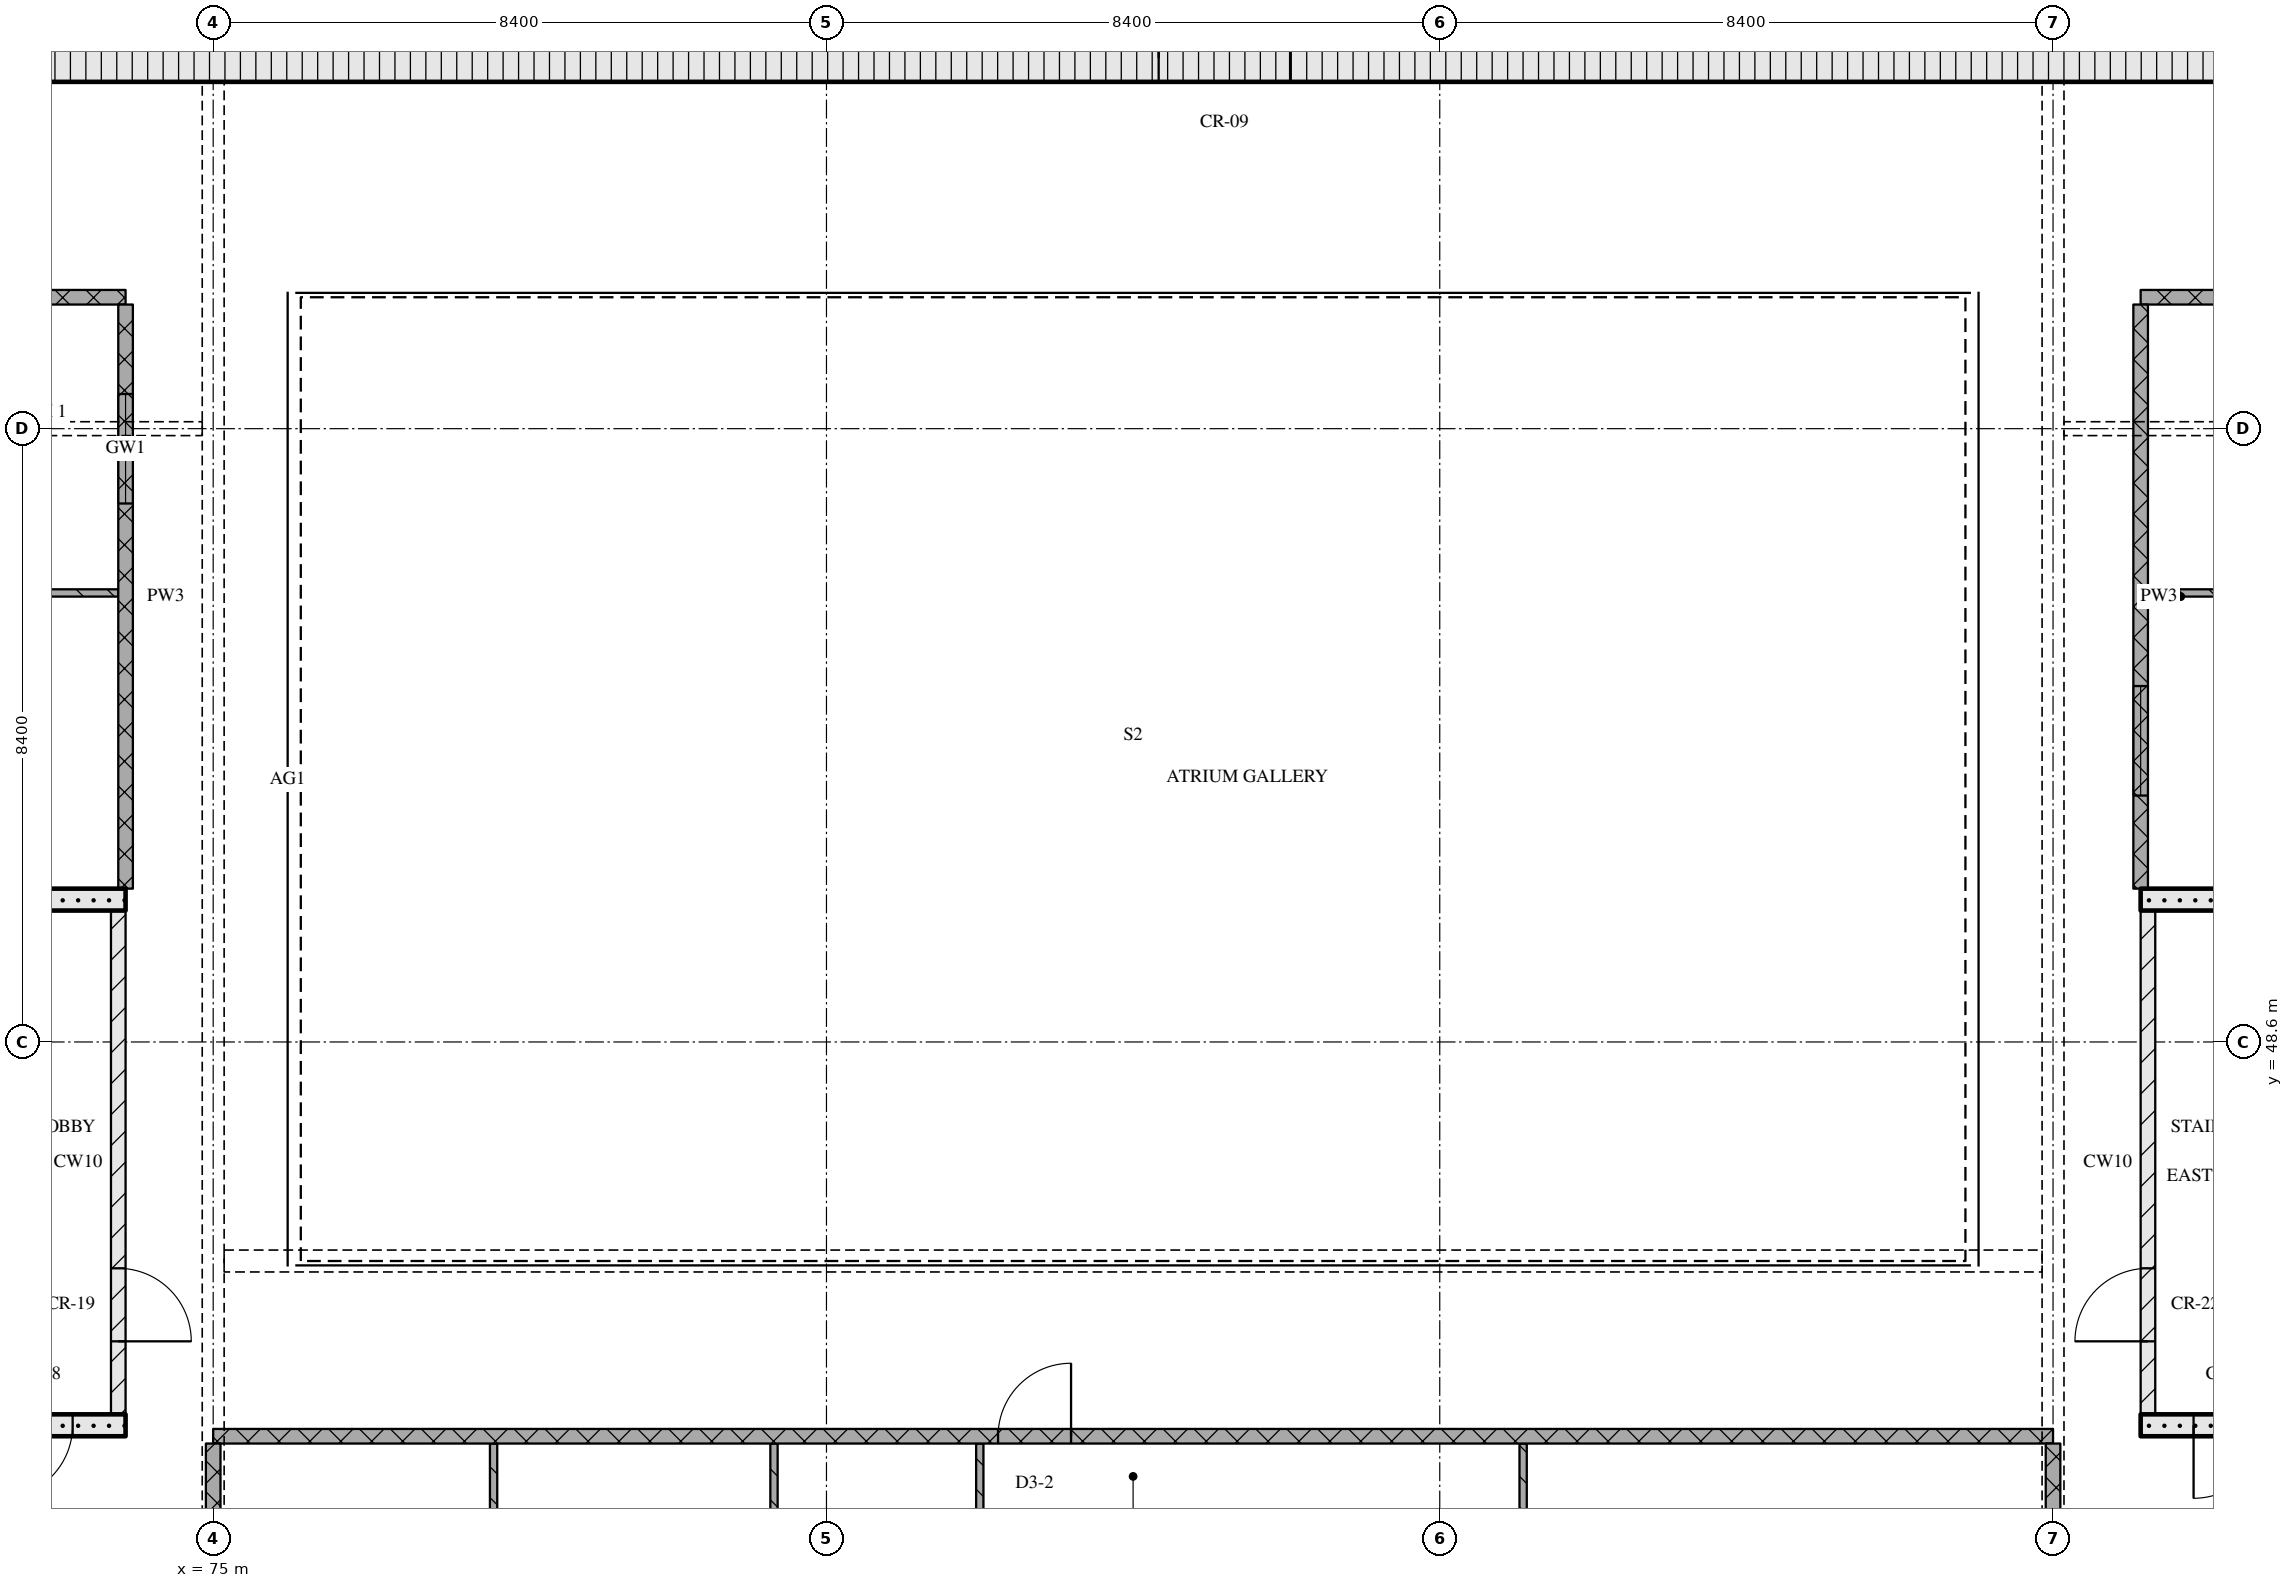
"""IFC4 building model, lengths in metres.
Left out: names, types, materials, properties, quantities, classifications, styles, units other than length and angle.
Written with IfcOpenShell. Run it as: python <this file> out.ifc"""

import sys

from ifc_helpers import new_model, si_unit, direction, frame, frame_2d, origin, place, context, subcontext, project, spatial, rectangle, extrude, element, fill, save


model = new_model("IFC4")
c1 = context("Model", 3, precision=1e-05, world=origin(), true_north=direction((0.0, 1.0)))
c2 = subcontext(c1, "Body", "Model", "MODEL_VIEW")
j1 = project(units=[si_unit("LENGTHUNIT", "METRE"), si_unit("PLANEANGLEUNIT", "RADIAN")], contexts=[c1])
p1 = place(None, origin())
s1 = spatial("IfcSite", under=j1, at=p1, CompositionType="ELEMENT")
p2 = place(p1, origin())
s2 = spatial("IfcBuilding", under=s1, at=p2, CompositionType="ELEMENT")
p3 = place(p2, frame((0.0, 0.0, 230.7)))
s3 = spatial("IfcBuildingStorey", under=s2, at=p3, CompositionType="ELEMENT", Elevation=230.7)
p4 = place(p3, frame((67.15, 62.075, 0.0), z_axis=(0.0, 0.0, 1.0), x_axis=(1.0, 0.0, 0.0)))
e1 = element("IfcWall", 1, at=p4, inside=s3, PredefinedType="SOLIDWALL", context=c2, shape_type="SweptSolid", body=[
    extrude(rectangle(XDim=40.9, YDim=0.65, at=frame_2d((20.45, 0.0))), origin(), (0.0, 0.0, 1.0), 3.32),
])
p5 = place(p4, frame((20.8, 0.0, 0.0)))
e2 = element("IfcOpeningElement", 2, at=p5, cuts=e1, PredefinedType="OPENING", context=c2, shape_type="SweptSolid", body=[
    extrude(rectangle(XDim=1.8, YDim=2.1, at=frame_2d((0.9, 1.05))), frame((0.0, 0.335, 0.0), z_axis=(0.0, -1.0, 0.0), x_axis=(1.0, 0.0, 0.0)), (0.0, 0.0, 1.0), 0.67),
])
p6 = place(p3, frame((68.2, 43.35, 0.0), z_axis=(0.0, 0.0, 1.0), x_axis=(1.0, 0.0, 0.0)))
e3 = element("IfcWall", 3, at=p6, inside=s3, PredefinedType="SOLIDWALL", context=c2, shape_type="SweptSolid", body=[
    extrude(rectangle(XDim=5.6, YDim=0.3, at=frame_2d((2.8, 0.0))), origin(), (0.0, 0.0, 1.0), 3.32),
])
p7 = place(p6, frame((3.875, 0.0, 0.0)))
e4 = element("IfcOpeningElement", 4, at=p7, cuts=e3, PredefinedType="OPENING", context=c2, shape_type="SweptSolid", body=[
    extrude(rectangle(XDim=1.0, YDim=2.1, at=frame_2d((0.5, 1.05))), frame((0.0, 0.16, 0.0), z_axis=(0.0, -1.0, 0.0), x_axis=(1.0, 0.0, 0.0)), (0.0, 0.0, 1.0), 0.32),
])
p8 = place(p3, frame((73.7, 43.5, 0.0), z_axis=(0.0, 0.0, 1.0), x_axis=(0.0, 1.0, 0.0)))
e5 = element("IfcWall", 5, at=p8, inside=s3, PredefinedType="PARTITIONING", context=c2, shape_type="SweptSolid", body=[
    extrude(rectangle(XDim=6.9, YDim=0.2, at=frame_2d((3.45, 0.0))), origin(), (0.0, 0.0, 1.0), 3.32),
])
p9 = place(p8, frame((1.0, 0.0, 0.0)))
e6 = element("IfcOpeningElement", 6, at=p9, cuts=e5, PredefinedType="OPENING", context=c2, shape_type="SweptSolid", body=[
    extrude(rectangle(XDim=1.0, YDim=2.1, at=frame_2d((0.5, 1.05))), frame((0.0, 0.11, 0.0), z_axis=(0.0, -1.0, 0.0), x_axis=(1.0, 0.0, 0.0)), (0.0, 0.0, 1.0), 0.22),
])
p10 = place(p3, frame((68.2, 50.55, 0.0), z_axis=(0.0, 0.0, 1.0), x_axis=(1.0, 0.0, 0.0)))
e7 = element("IfcWall", 7, at=p10, inside=s3, PredefinedType="SOLIDWALL", context=c2, shape_type="SweptSolid", body=[
    extrude(rectangle(XDim=5.6, YDim=0.3, at=frame_2d((2.8, 0.0))), origin(), (0.0, 0.0, 1.0), 3.32),
])
p11 = place(p3, frame((101.4, 43.35, 0.0), z_axis=(0.0, 0.0, 1.0), x_axis=(1.0, 0.0, 0.0)))
e8 = element("IfcWall", 8, at=p11, inside=s3, PredefinedType="SOLIDWALL", context=c2, shape_type="SweptSolid", body=[
    extrude(rectangle(XDim=5.6, YDim=0.3, at=frame_2d((2.8, 0.0))), origin(), (0.0, 0.0, 1.0), 3.32),
])
p12 = place(p11, frame((0.725, 0.0, 0.0)))
e9 = element("IfcOpeningElement", 9, at=p12, cuts=e8, PredefinedType="OPENING", context=c2, shape_type="SweptSolid", body=[
    extrude(rectangle(XDim=1.0, YDim=2.1, at=frame_2d((0.5, 1.05))), frame((0.0, 0.16, 0.0), z_axis=(0.0, -1.0, 0.0), x_axis=(1.0, 0.0, 0.0)), (0.0, 0.0, 1.0), 0.32),
])
p13 = place(p3, frame((101.5, 43.5, 0.0), z_axis=(0.0, 0.0, 1.0), x_axis=(0.0, 1.0, 0.0)))
e10 = element("IfcWall", 10, at=p13, inside=s3, PredefinedType="PARTITIONING", context=c2, shape_type="SweptSolid", body=[
    extrude(rectangle(XDim=6.9, YDim=0.2, at=frame_2d((3.45, 0.0))), origin(), (0.0, 0.0, 1.0), 3.32),
])
p14 = place(p13, frame((1.0, 0.0, 0.0)))
e11 = element("IfcOpeningElement", 11, at=p14, cuts=e10, PredefinedType="OPENING", context=c2, shape_type="SweptSolid", body=[
    extrude(rectangle(XDim=1.0, YDim=2.1, at=frame_2d((0.5, 1.05))), frame((0.0, 0.11, 0.0), z_axis=(0.0, -1.0, 0.0), x_axis=(1.0, 0.0, 0.0)), (0.0, 0.0, 1.0), 0.22),
])
p15 = place(p3, frame((101.4, 50.55, 0.0), z_axis=(0.0, 0.0, 1.0), x_axis=(1.0, 0.0, 0.0)))
e12 = element("IfcWall", 12, at=p15, inside=s3, PredefinedType="SOLIDWALL", context=c2, shape_type="SweptSolid", body=[
    extrude(rectangle(XDim=5.6, YDim=0.3, at=frame_2d((2.8, 0.0))), origin(), (0.0, 0.0, 1.0), 3.32),
])
p16 = place(p3, frame((100.2, 43.2, 0.0), z_axis=(0.0, 0.0, 1.0), x_axis=(-1.0, 0.0, 0.0)))
e13 = element("IfcWall", 13, at=p16, inside=s3, PredefinedType="PARTITIONING", context=c2, shape_type="SweptSolid", body=[
    extrude(rectangle(XDim=25.2, YDim=0.2, at=frame_2d((12.6, 0.0))), origin(), (0.0, 0.0, 1.0), 3.32),
])
p17 = place(p16, frame((13.45, 0.0, 0.0)))
e14 = element("IfcOpeningElement", 14, at=p17, cuts=e13, PredefinedType="OPENING", context=c2, shape_type="SweptSolid", body=[
    extrude(rectangle(XDim=1.0, YDim=2.1, at=frame_2d((0.5, 1.05))), frame((0.0, 0.11, 0.0), z_axis=(0.0, -1.0, 0.0), x_axis=(1.0, 0.0, 0.0)), (0.0, 0.0, 1.0), 0.22),
])
p18 = place(p3, frame((69.3, 54.75, 0.0), z_axis=(0.0, 0.0, 1.0), x_axis=(1.0, 0.0, 0.0)))
e15 = element("IfcWall", 15, at=p18, inside=s3, PredefinedType="PARTITIONING", context=c2, shape_type="SweptSolid", body=[
    extrude(rectangle(XDim=4.4, YDim=0.1, at=frame_2d((2.2, 0.0))), origin(), (0.0, 0.0, 1.0), 3.32),
])
p19 = place(p3, frame((105.9, 54.75, 0.0), z_axis=(0.0, 0.0, 1.0), x_axis=(-1.0, 0.0, 0.0)))
e16 = element("IfcWall", 16, at=p19, inside=s3, PredefinedType="PARTITIONING", context=c2, shape_type="SweptSolid", body=[
    extrude(rectangle(XDim=4.4, YDim=0.1, at=frame_2d((2.2, 0.0))), origin(), (0.0, 0.0, 1.0), 3.32),
])
p20 = place(p19, frame((1.8, 0.0, 0.0)))
e17 = element("IfcOpeningElement", 17, at=p20, cuts=e16, PredefinedType="OPENING", context=c2, shape_type="SweptSolid", body=[
    extrude(rectangle(XDim=0.9, YDim=2.1, at=frame_2d((0.45, 1.05))), frame((0.0, 0.06, 0.0), z_axis=(0.0, -1.0, 0.0), x_axis=(1.0, 0.0, 0.0)), (0.0, 0.0, 1.0), 0.12),
])
p21 = place(p3, frame((63.0, 58.8, 0.0), z_axis=(0.0, 0.0, 1.0), x_axis=(1.0, 0.0, 0.0)))
e18 = element("IfcWall", 18, at=p21, inside=s3, PredefinedType="PARTITIONING", context=c2, shape_type="SweptSolid", body=[
    extrude(rectangle(XDim=10.8, YDim=0.2, at=frame_2d((5.4, 0.0))), origin(), (0.0, 0.0, 1.0), 3.32),
])
p22 = place(p3, frame((112.2, 58.8, 0.0), z_axis=(0.0, 0.0, 1.0), x_axis=(-1.0, 0.0, 0.0)))
e19 = element("IfcWall", 19, at=p22, inside=s3, PredefinedType="PARTITIONING", context=c2, shape_type="SweptSolid", body=[
    extrude(rectangle(XDim=10.8, YDim=0.2, at=frame_2d((5.4, 0.0))), origin(), (0.0, 0.0, 1.0), 3.32),
])
p23 = place(p22, frame((6.45, 0.0, 0.0)))
e20 = element("IfcOpeningElement", 20, at=p23, cuts=e19, PredefinedType="OPENING", context=c2, shape_type="SweptSolid", body=[
    extrude(rectangle(XDim=1.0, YDim=2.1, at=frame_2d((0.5, 1.05))), frame((0.0, 0.11, 0.0), z_axis=(0.0, -1.0, 0.0), x_axis=(1.0, 0.0, 0.0)), (0.0, 0.0, 1.0), 0.22),
])
p24 = place(p3, frame((73.8, 58.7, 0.0), z_axis=(0.0, 0.0, 1.0), x_axis=(0.0, -1.0, 0.0)))
e21 = element("IfcWall", 21, at=p24, inside=s3, PredefinedType="PARTITIONING", context=c2, shape_type="SweptSolid", body=[
    extrude(rectangle(XDim=8.0, YDim=0.2, at=frame_2d((4.0, 0.0))), origin(), (0.0, 0.0, 1.0), 3.32),
])
p25 = place(p24, frame((1.225, 0.0, 0.9)))
e22 = element("IfcOpeningElement", 22, at=p25, cuts=e21, PredefinedType="OPENING", context=c2, shape_type="SweptSolid", body=[
    extrude(rectangle(XDim=1.5, YDim=1.5, at=frame_2d((0.75, 0.75))), frame((0.0, 0.11, 0.0), z_axis=(0.0, -1.0, 0.0), x_axis=(1.0, 0.0, 0.0)), (0.0, 0.0, 1.0), 0.22),
])
p26 = place(p3, frame((75.0, 43.1, 0.0), z_axis=(0.0, 0.0, 1.0), x_axis=(0.0, -1.0, 0.0)))
e23 = element("IfcWall", 23, at=p26, inside=s3, PredefinedType="PARTITIONING", context=c2, shape_type="SweptSolid", body=[
    extrude(rectangle(XDim=2.2, YDim=0.2, at=frame_2d((1.1, 0.0))), origin(), (0.0, 0.0, 1.0), 2.53),
])
for number, where, z_axis, x_axis in (
    (24, (78.841, 43.1, 0.0), (0.0, 0.0, 1.0), (0.0, -1.0, 0.0)),
    (25, (82.681, 43.1, 0.0), (0.0, 0.0, 1.0), (0.0, -1.0, 0.0)),
    (26, (85.5, 43.1, 0.0), (0.0, 0.0, 1.0), (0.0, -1.0, 0.0)),
    (27, (92.942, 43.1, 0.0), (0.0, 0.0, 1.0), (0.0, -1.0, 0.0)),
):
    element("IfcWall", number, at=place(p3, frame(where, z_axis=z_axis, x_axis=x_axis)), inside=s3, PredefinedType="PARTITIONING", context=c2, shape_type="SweptSolid", body=[
        extrude(rectangle(XDim=6.75, YDim=0.1, at=frame_2d((3.375, 0.0))), origin(), (0.0, 0.0, 1.0), 3.32),
    ])
p27 = place(p3, frame((100.2, 43.1, 0.0), z_axis=(0.0, 0.0, 1.0), x_axis=(0.0, -1.0, 0.0)))
e28 = element("IfcWall", 28, at=p27, inside=s3, PredefinedType="PARTITIONING", context=c2, shape_type="SweptSolid", body=[
    extrude(rectangle(XDim=2.2, YDim=0.2, at=frame_2d((1.1, 0.0))), origin(), (0.0, 0.0, 1.0), 2.53),
])
p28 = place(p3, frame((101.4, 58.7, 0.0), z_axis=(0.0, 0.0, 1.0), x_axis=(0.0, -1.0, 0.0)))
e29 = element("IfcWall", 29, at=p28, inside=s3, PredefinedType="PARTITIONING", context=c2, shape_type="SweptSolid", body=[
    extrude(rectangle(XDim=8.0, YDim=0.2, at=frame_2d((4.0, 0.0))), origin(), (0.0, 0.0, 1.0), 3.32),
])
p29 = place(p28, frame((5.225, 0.0, 0.9)))
e30 = element("IfcOpeningElement", 30, at=p29, cuts=e29, PredefinedType="OPENING", context=c2, shape_type="SweptSolid", body=[
    extrude(rectangle(XDim=1.5, YDim=1.5, at=frame_2d((0.75, 0.75))), frame((0.0, 0.11, 0.0), z_axis=(0.0, -1.0, 0.0), x_axis=(1.0, 0.0, 0.0)), (0.0, 0.0, 1.0), 0.22),
])
p30 = place(p5, origin())
e31 = element("IfcDoor", 31, at=p30, inside=s3, OperationType="DOUBLE_DOOR_SINGLE_SWING", PredefinedType="DOOR", context=c2, shape_type="SweptSolid", body=[
    extrude(rectangle(XDim=1.8, YDim=2.1, at=frame_2d((0.9, 1.05))), frame((0.0, 0.025, 0.0), z_axis=(0.0, -1.0, 0.0), x_axis=(1.0, 0.0, 0.0)), (0.0, 0.0, 1.0), 0.05),
])
fill(e2, e31)
p31 = place(p7, origin())
e32 = element("IfcDoor", 32, at=p31, inside=s3, OperationType="SINGLE_SWING_RIGHT", PredefinedType="DOOR", context=c2, shape_type="SweptSolid", body=[
    extrude(rectangle(XDim=1.0, YDim=2.1, at=frame_2d((0.5, 1.05))), frame((0.0, 0.025, 0.0), z_axis=(0.0, -1.0, 0.0), x_axis=(1.0, 0.0, 0.0)), (0.0, 0.0, 1.0), 0.05),
])
fill(e4, e32)
p32 = place(p9, origin())
e33 = element("IfcDoor", 33, at=p32, inside=s3, OperationType="SINGLE_SWING_RIGHT", PredefinedType="DOOR", context=c2, shape_type="SweptSolid", body=[
    extrude(rectangle(XDim=1.0, YDim=2.1, at=frame_2d((0.5, 1.05))), frame((0.0, 0.025, 0.0), z_axis=(0.0, -1.0, 0.0), x_axis=(1.0, 0.0, 0.0)), (0.0, 0.0, 1.0), 0.05),
])
fill(e6, e33)
p33 = place(p12, origin())
e34 = element("IfcDoor", 34, at=p33, inside=s3, OperationType="SINGLE_SWING_RIGHT", PredefinedType="DOOR", context=c2, shape_type="SweptSolid", body=[
    extrude(rectangle(XDim=1.0, YDim=2.1, at=frame_2d((0.5, 1.05))), frame((0.0, 0.025, 0.0), z_axis=(0.0, -1.0, 0.0), x_axis=(1.0, 0.0, 0.0)), (0.0, 0.0, 1.0), 0.05),
])
fill(e9, e34)
p34 = place(p14, origin())
e35 = element("IfcDoor", 35, at=p34, inside=s3, OperationType="SINGLE_SWING_LEFT", PredefinedType="DOOR", context=c2, shape_type="SweptSolid", body=[
    extrude(rectangle(XDim=1.0, YDim=2.1, at=frame_2d((0.5, 1.05))), frame((0.0, 0.025, 0.0), z_axis=(0.0, -1.0, 0.0), x_axis=(1.0, 0.0, 0.0)), (0.0, 0.0, 1.0), 0.05),
])
fill(e11, e35)
p35 = place(p17, origin())
e36 = element("IfcDoor", 36, at=p35, inside=s3, OperationType="SINGLE_SWING_RIGHT", PredefinedType="DOOR", context=c2, shape_type="SweptSolid", body=[
    extrude(rectangle(XDim=1.0, YDim=2.1, at=frame_2d((0.5, 1.05))), frame((0.0, 0.025, 0.0), z_axis=(0.0, -1.0, 0.0), x_axis=(1.0, 0.0, 0.0)), (0.0, 0.0, 1.0), 0.05),
])
fill(e14, e36)
p36 = place(p25, origin())
e37 = element("IfcWindow", 37, at=p36, inside=s3, PartitioningType="SINGLE_PANEL", PredefinedType="WINDOW", context=c2, shape_type="SweptSolid", body=[
    extrude(rectangle(XDim=1.5, YDim=1.5, at=frame_2d((0.75, 0.75))), frame((0.0, 0.03, 0.0), z_axis=(0.0, -1.0, 0.0), x_axis=(1.0, 0.0, 0.0)), (0.0, 0.0, 1.0), 0.06),
])
fill(e22, e37)
p37 = place(p29, origin())
e38 = element("IfcWindow", 38, at=p37, inside=s3, PartitioningType="SINGLE_PANEL", PredefinedType="WINDOW", context=c2, shape_type="SweptSolid", body=[
    extrude(rectangle(XDim=1.5, YDim=1.5, at=frame_2d((0.75, 0.75))), frame((0.0, 0.03, 0.0), z_axis=(0.0, -1.0, 0.0), x_axis=(1.0, 0.0, 0.0)), (0.0, 0.0, 1.0), 0.06),
])
fill(e30, e38)
save(model, sys.argv[1])
